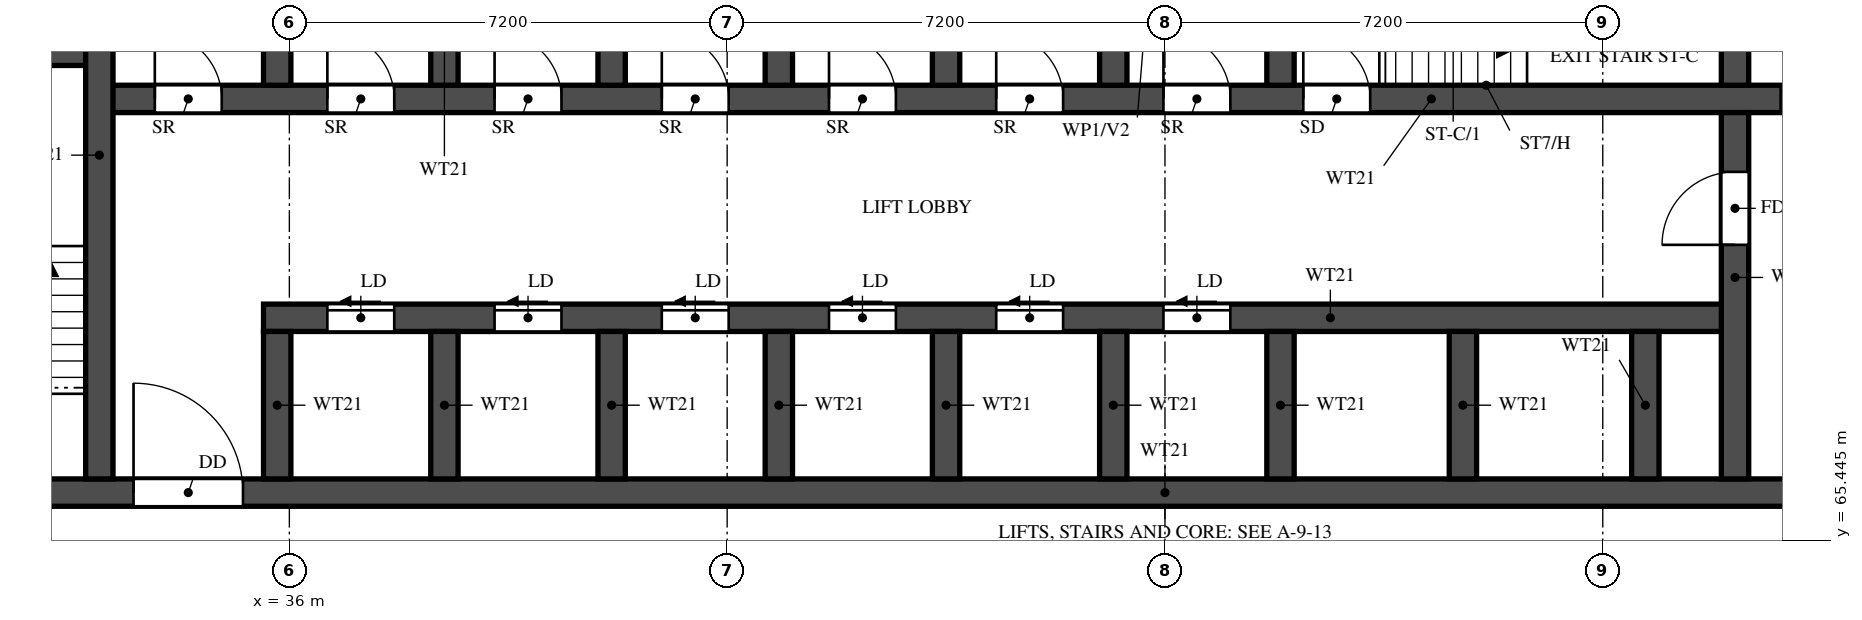
"""IFC4 building model, lengths in metres.
Left out: names, types, materials, properties, quantities, classifications, styles, units other than length and angle.
Written with IfcOpenShell. Run it as: python <this file> out.ifc"""

import sys

from ifc_helpers import new_model, si_unit, direction, frame, frame_2d, origin, place, context, subcontext, project, spatial, rectangle, extrude, element, fill, save


model = new_model("IFC4")
c1 = context("Model", 3, precision=1e-05, world=origin(), true_north=direction((0.0, 1.0)))
c2 = subcontext(c1, "Body", "Model", "MODEL_VIEW")
j1 = project(units=[si_unit("LENGTHUNIT", "METRE"), si_unit("PLANEANGLEUNIT", "RADIAN")], contexts=[c1])
p1 = place(None, origin())
s1 = spatial("IfcSite", under=j1, at=p1, CompositionType="ELEMENT")
p2 = place(p1, origin())
s2 = spatial("IfcBuilding", under=s1, at=p2, CompositionType="ELEMENT")
p3 = place(p2, frame((0.0, 0.0, 83.0)))
s3 = spatial("IfcBuildingStorey", under=s2, at=p3, CompositionType="ELEMENT", Elevation=83.0)
p4 = place(p3, frame((29.7, 66.225, 0.0), z_axis=(0.0, 0.0, 1.0), x_axis=(1.0, 0.0, 0.0)))
e1 = element("IfcWall", 1, at=p4, inside=s3, PredefinedType="SHEAR", context=c2, shape_type="SweptSolid", body=[
    extrude(rectangle(XDim=41.4, YDim=0.45, at=frame_2d((20.7, 0.0))), origin(), (0.0, 0.0, 1.0), 3.18),
])
p5 = place(p4, frame((0.925, 0.0, 0.0)))
e2 = element("IfcOpeningElement", 2, at=p5, cuts=e1, PredefinedType="OPENING", context=c2, shape_type="SweptSolid", body=[
    extrude(rectangle(XDim=1.1, YDim=2.1, at=frame_2d((0.55, 1.05))), frame((0.0, 0.235, 0.0), z_axis=(0.0, -1.0, 0.0), x_axis=(1.0, 0.0, 0.0)), (0.0, 0.0, 1.0), 0.47),
])
p6 = place(p4, frame((3.738, 0.0, 0.0)))
e3 = element("IfcOpeningElement", 3, at=p6, cuts=e1, PredefinedType="OPENING", context=c2, shape_type="SweptSolid", body=[
    extrude(rectangle(XDim=1.8, YDim=2.1, at=frame_2d((0.9, 1.05))), frame((0.0, 0.235, 0.0), z_axis=(0.0, -1.0, 0.0), x_axis=(1.0, 0.0, 0.0)), (0.0, 0.0, 1.0), 0.47),
])
p7 = place(p3, frame((35.575, 69.1, 0.0), z_axis=(0.0, 0.0, 1.0), x_axis=(1.0, 0.0, 0.0)))
e4 = element("IfcWall", 4, at=p7, inside=s3, PredefinedType="SHEAR", context=c2, shape_type="SweptSolid", body=[
    extrude(rectangle(XDim=24.2, YDim=0.45, at=frame_2d((12.1, 0.0))), origin(), (0.0, 0.0, 1.0), 3.18),
])
p8 = place(p7, frame((1.05, 0.0, 0.0)))
e5 = element("IfcOpeningElement", 5, at=p8, cuts=e4, PredefinedType="OPENING", context=c2, shape_type="SweptSolid", body=[
    extrude(rectangle(XDim=1.1, YDim=2.1, at=frame_2d((0.55, 1.05))), frame((0.0, 0.235, 0.0), z_axis=(0.0, -1.0, 0.0), x_axis=(1.0, 0.0, 0.0)), (0.0, 0.0, 1.0), 0.47),
])
p9 = place(p7, frame((3.8, 0.0, 0.0)))
e6 = element("IfcOpeningElement", 6, at=p9, cuts=e4, PredefinedType="OPENING", context=c2, shape_type="SweptSolid", body=[
    extrude(rectangle(XDim=1.1, YDim=2.1, at=frame_2d((0.55, 1.05))), frame((0.0, 0.235, 0.0), z_axis=(0.0, -1.0, 0.0), x_axis=(1.0, 0.0, 0.0)), (0.0, 0.0, 1.0), 0.47),
])
p10 = place(p7, frame((6.55, 0.0, 0.0)))
e7 = element("IfcOpeningElement", 7, at=p10, cuts=e4, PredefinedType="OPENING", context=c2, shape_type="SweptSolid", body=[
    extrude(rectangle(XDim=1.1, YDim=2.1, at=frame_2d((0.55, 1.05))), frame((0.0, 0.235, 0.0), z_axis=(0.0, -1.0, 0.0), x_axis=(1.0, 0.0, 0.0)), (0.0, 0.0, 1.0), 0.47),
])
p11 = place(p7, frame((9.3, 0.0, 0.0)))
e8 = element("IfcOpeningElement", 8, at=p11, cuts=e4, PredefinedType="OPENING", context=c2, shape_type="SweptSolid", body=[
    extrude(rectangle(XDim=1.1, YDim=2.1, at=frame_2d((0.55, 1.05))), frame((0.0, 0.235, 0.0), z_axis=(0.0, -1.0, 0.0), x_axis=(1.0, 0.0, 0.0)), (0.0, 0.0, 1.0), 0.47),
])
p12 = place(p7, frame((12.05, 0.0, 0.0)))
e9 = element("IfcOpeningElement", 9, at=p12, cuts=e4, PredefinedType="OPENING", context=c2, shape_type="SweptSolid", body=[
    extrude(rectangle(XDim=1.1, YDim=2.1, at=frame_2d((0.55, 1.05))), frame((0.0, 0.235, 0.0), z_axis=(0.0, -1.0, 0.0), x_axis=(1.0, 0.0, 0.0)), (0.0, 0.0, 1.0), 0.47),
])
p13 = place(p7, frame((14.8, 0.0, 0.0)))
e10 = element("IfcOpeningElement", 10, at=p13, cuts=e4, PredefinedType="OPENING", context=c2, shape_type="SweptSolid", body=[
    extrude(rectangle(XDim=1.1, YDim=2.1, at=frame_2d((0.55, 1.05))), frame((0.0, 0.235, 0.0), z_axis=(0.0, -1.0, 0.0), x_axis=(1.0, 0.0, 0.0)), (0.0, 0.0, 1.0), 0.47),
])
p14 = place(p3, frame((32.875, 72.7, 0.0), z_axis=(0.0, 0.0, 1.0), x_axis=(1.0, 0.0, 0.0)))
e11 = element("IfcWall", 11, at=p14, inside=s3, PredefinedType="SHEAR", context=c2, shape_type="SweptSolid", body=[
    extrude(rectangle(XDim=35.05, YDim=0.45, at=frame_2d((17.525, 0.0))), origin(), (0.0, 0.0, 1.0), 3.18),
])
p15 = place(p14, frame((19.8, 0.0, 0.0)))
e12 = element("IfcOpeningElement", 12, at=p15, cuts=e11, PredefinedType="OPENING", context=c2, shape_type="SweptSolid", body=[
    extrude(rectangle(XDim=1.1, YDim=2.1, at=frame_2d((0.55, 1.05))), frame((0.0, 0.235, 0.0), z_axis=(0.0, -1.0, 0.0), x_axis=(1.0, 0.0, 0.0)), (0.0, 0.0, 1.0), 0.47),
])
p16 = place(p14, frame((27.65, 0.0, 0.0)))
e13 = element("IfcOpeningElement", 13, at=p16, cuts=e11, PredefinedType="OPENING", context=c2, shape_type="SweptSolid", body=[
    extrude(rectangle(XDim=1.1, YDim=2.1, at=frame_2d((0.55, 1.05))), frame((0.0, 0.235, 0.0), z_axis=(0.0, -1.0, 0.0), x_axis=(1.0, 0.0, 0.0)), (0.0, 0.0, 1.0), 0.47),
])
p17 = place(p14, frame((30.25, 0.0, 0.0)))
e14 = element("IfcOpeningElement", 14, at=p17, cuts=e11, PredefinedType="OPENING", context=c2, shape_type="SweptSolid", body=[
    extrude(rectangle(XDim=1.1, YDim=2.1, at=frame_2d((0.55, 1.05))), frame((0.0, 0.235, 0.0), z_axis=(0.0, -1.0, 0.0), x_axis=(1.0, 0.0, 0.0)), (0.0, 0.0, 1.0), 0.47),
])
p18 = place(p14, frame((3.75, 0.0, 0.0)))
e15 = element("IfcOpeningElement", 15, at=p18, cuts=e11, PredefinedType="OPENING", context=c2, shape_type="SweptSolid", body=[
    extrude(rectangle(XDim=1.1, YDim=2.1, at=frame_2d((0.55, 1.05))), frame((0.0, 0.235, 0.0), z_axis=(0.0, -1.0, 0.0), x_axis=(1.0, 0.0, 0.0)), (0.0, 0.0, 1.0), 0.47),
])
p19 = place(p14, frame((6.5, 0.0, 0.0)))
e16 = element("IfcOpeningElement", 16, at=p19, cuts=e11, PredefinedType="OPENING", context=c2, shape_type="SweptSolid", body=[
    extrude(rectangle(XDim=1.1, YDim=2.1, at=frame_2d((0.55, 1.05))), frame((0.0, 0.235, 0.0), z_axis=(0.0, -1.0, 0.0), x_axis=(1.0, 0.0, 0.0)), (0.0, 0.0, 1.0), 0.47),
])
p20 = place(p14, frame((9.25, 0.0, 0.0)))
e17 = element("IfcOpeningElement", 17, at=p20, cuts=e11, PredefinedType="OPENING", context=c2, shape_type="SweptSolid", body=[
    extrude(rectangle(XDim=1.1, YDim=2.1, at=frame_2d((0.55, 1.05))), frame((0.0, 0.235, 0.0), z_axis=(0.0, -1.0, 0.0), x_axis=(1.0, 0.0, 0.0)), (0.0, 0.0, 1.0), 0.47),
])
p21 = place(p14, frame((12.0, 0.0, 0.0)))
e18 = element("IfcOpeningElement", 18, at=p21, cuts=e11, PredefinedType="OPENING", context=c2, shape_type="SweptSolid", body=[
    extrude(rectangle(XDim=1.1, YDim=2.1, at=frame_2d((0.55, 1.05))), frame((0.0, 0.235, 0.0), z_axis=(0.0, -1.0, 0.0), x_axis=(1.0, 0.0, 0.0)), (0.0, 0.0, 1.0), 0.47),
])
p22 = place(p14, frame((14.75, 0.0, 0.0)))
e19 = element("IfcOpeningElement", 19, at=p22, cuts=e11, PredefinedType="OPENING", context=c2, shape_type="SweptSolid", body=[
    extrude(rectangle(XDim=1.1, YDim=2.1, at=frame_2d((0.55, 1.05))), frame((0.0, 0.235, 0.0), z_axis=(0.0, -1.0, 0.0), x_axis=(1.0, 0.0, 0.0)), (0.0, 0.0, 1.0), 0.47),
])
p23 = place(p14, frame((17.5, 0.0, 0.0)))
e20 = element("IfcOpeningElement", 20, at=p23, cuts=e11, PredefinedType="OPENING", context=c2, shape_type="SweptSolid", body=[
    extrude(rectangle(XDim=1.1, YDim=2.1, at=frame_2d((0.55, 1.05))), frame((0.0, 0.235, 0.0), z_axis=(0.0, -1.0, 0.0), x_axis=(1.0, 0.0, 0.0)), (0.0, 0.0, 1.0), 0.47),
])
p24 = place(p14, frame((0.913, 0.0, 0.0)))
e21 = element("IfcOpeningElement", 21, at=p24, cuts=e11, PredefinedType="OPENING", context=c2, shape_type="SweptSolid", body=[
    extrude(rectangle(XDim=1.1, YDim=2.1, at=frame_2d((0.55, 1.05))), frame((0.0, 0.235, 0.0), z_axis=(0.0, -1.0, 0.0), x_axis=(1.0, 0.0, 0.0)), (0.0, 0.0, 1.0), 0.47),
])
p25 = place(p3, frame((29.7, 73.475, 0.0), z_axis=(0.0, 0.0, 1.0), x_axis=(1.0, 0.0, 0.0)))
e22 = element("IfcWall", 22, at=p25, inside=s3, PredefinedType="SHEAR", context=c2, shape_type="SweptSolid", body=[
    extrude(rectangle(XDim=3.175, YDim=0.45, at=frame_2d((1.587, 0.0))), origin(), (0.0, 0.0, 1.0), 3.18),
])
p26 = place(p3, frame((32.875, 66.45, 0.0), z_axis=(0.0, 0.0, 1.0), x_axis=(0.0, 1.0, 0.0)))
e23 = element("IfcWall", 23, at=p26, inside=s3, PredefinedType="SHEAR", context=c2, shape_type="SweptSolid", body=[
    extrude(rectangle(XDim=10.65, YDim=0.45, at=frame_2d((5.325, 0.0))), origin(), (0.0, 0.0, 1.0), 3.18),
])
p27 = place(p3, frame((59.775, 66.45, 0.0), z_axis=(0.0, 0.0, 1.0), x_axis=(0.0, 1.0, 0.0)))
e24 = element("IfcWall", 24, at=p27, inside=s3, PredefinedType="SHEAR", context=c2, shape_type="SweptSolid", body=[
    extrude(rectangle(XDim=6.025, YDim=0.45, at=frame_2d((3.013, 0.0))), origin(), (0.0, 0.0, 1.0), 3.18),
])
p28 = place(p27, frame((3.85, 0.0, 0.0)))
e25 = element("IfcOpeningElement", 25, at=p28, cuts=e24, PredefinedType="OPENING", context=c2, shape_type="SweptSolid", body=[
    extrude(rectangle(XDim=1.2, YDim=2.1, at=frame_2d((0.6, 1.05))), frame((0.0, 0.235, 0.0), z_axis=(0.0, -1.0, 0.0), x_axis=(1.0, 0.0, 0.0)), (0.0, 0.0, 1.0), 0.47),
])
p29 = place(p3, frame((59.775, 72.925, 0.0), z_axis=(0.0, 0.0, 1.0), x_axis=(0.0, 1.0, 0.0)))
e26 = element("IfcWall", 26, at=p29, inside=s3, PredefinedType="SHEAR", context=c2, shape_type="SweptSolid", body=[
    extrude(rectangle(XDim=2.95, YDim=0.45, at=frame_2d((1.475, 0.0))), origin(), (0.0, 0.0, 1.0), 3.18),
])
for number, where, z_axis, x_axis in (
    (27, (35.8, 66.45, 0.0), (0.0, 0.0, 1.0), (0.0, 1.0, 0.0)),
    (28, (38.55, 66.45, 0.0), (0.0, 0.0, 1.0), (0.0, 1.0, 0.0)),
    (29, (41.3, 66.45, 0.0), (0.0, 0.0, 1.0), (0.0, 1.0, 0.0)),
    (30, (44.05, 66.45, 0.0), (0.0, 0.0, 1.0), (0.0, 1.0, 0.0)),
    (31, (46.8, 66.45, 0.0), (0.0, 0.0, 1.0), (0.0, 1.0, 0.0)),
    (32, (49.55, 66.45, 0.0), (0.0, 0.0, 1.0), (0.0, 1.0, 0.0)),
    (33, (52.3, 66.45, 0.0), (0.0, 0.0, 1.0), (0.0, 1.0, 0.0)),
    (34, (55.3, 66.45, 0.0), (0.0, 0.0, 1.0), (0.0, 1.0, 0.0)),
    (35, (58.3, 66.45, 0.0), (0.0, 0.0, 1.0), (0.0, 1.0, 0.0)),
):
    element("IfcWall", number, at=place(p3, frame(where, z_axis=z_axis, x_axis=x_axis)), inside=s3, PredefinedType="SHEAR", context=c2, shape_type="SweptSolid", body=[
        extrude(rectangle(XDim=2.425, YDim=0.45, at=frame_2d((1.212, 0.0))), origin(), (0.0, 0.0, 1.0), 3.18),
    ])
for number, where, z_axis, x_axis in (
    (36, (35.8, 72.925, 0.0), (0.0, 0.0, 1.0), (0.0, 1.0, 0.0)),
    (37, (38.55, 72.925, 0.0), (0.0, 0.0, 1.0), (0.0, 1.0, 0.0)),
    (38, (41.3, 72.925, 0.0), (0.0, 0.0, 1.0), (0.0, 1.0, 0.0)),
    (39, (44.05, 72.925, 0.0), (0.0, 0.0, 1.0), (0.0, 1.0, 0.0)),
    (40, (46.8, 72.925, 0.0), (0.0, 0.0, 1.0), (0.0, 1.0, 0.0)),
    (41, (49.55, 72.925, 0.0), (0.0, 0.0, 1.0), (0.0, 1.0, 0.0)),
    (42, (52.3, 72.925, 0.0), (0.0, 0.0, 1.0), (0.0, 1.0, 0.0)),
):
    element("IfcWall", number, at=place(p3, frame(where, z_axis=z_axis, x_axis=x_axis)), inside=s3, PredefinedType="SHEAR", context=c2, shape_type="SweptSolid", body=[
        extrude(rectangle(XDim=2.95, YDim=0.45, at=frame_2d((1.475, 0.0))), origin(), (0.0, 0.0, 1.0), 3.18),
    ])
p30 = place(p15, origin())
e43 = element("IfcDoor", 43, at=p30, inside=s3, OperationType="SINGLE_SWING_LEFT", PredefinedType="DOOR", context=c2, shape_type="SweptSolid", body=[
    extrude(rectangle(XDim=1.1, YDim=2.1, at=frame_2d((0.55, 1.05))), frame((0.0, 0.025, 0.0), z_axis=(0.0, -1.0, 0.0), x_axis=(1.0, 0.0, 0.0)), (0.0, 0.0, 1.0), 0.05),
])
fill(e12, e43)
p31 = place(p6, origin())
e44 = element("IfcDoor", 44, at=p31, inside=s3, OperationType="DOUBLE_DOOR_SINGLE_SWING", PredefinedType="DOOR", context=c2, shape_type="SweptSolid", body=[
    extrude(rectangle(XDim=1.8, YDim=2.1, at=frame_2d((0.9, 1.05))), frame((0.0, 0.025, 0.0), z_axis=(0.0, -1.0, 0.0), x_axis=(1.0, 0.0, 0.0)), (0.0, 0.0, 1.0), 0.05),
])
fill(e3, e44)
p32 = place(p28, origin())
e45 = element("IfcDoor", 45, at=p32, inside=s3, OperationType="SINGLE_SWING_RIGHT", PredefinedType="DOOR", context=c2, shape_type="SweptSolid", body=[
    extrude(rectangle(XDim=1.2, YDim=2.1, at=frame_2d((0.6, 1.05))), frame((0.0, 0.025, 0.0), z_axis=(0.0, -1.0, 0.0), x_axis=(1.0, 0.0, 0.0)), (0.0, 0.0, 1.0), 0.05),
])
fill(e25, e45)
p33 = place(p16, origin())
e46 = element("IfcDoor", 46, at=p33, inside=s3, OperationType="SLIDING_TO_LEFT", PredefinedType="DOOR", context=c2, shape_type="SweptSolid", body=[
    extrude(rectangle(XDim=1.1, YDim=2.1, at=frame_2d((0.55, 1.05))), frame((0.0, 0.025, 0.0), z_axis=(0.0, -1.0, 0.0), x_axis=(1.0, 0.0, 0.0)), (0.0, 0.0, 1.0), 0.05),
])
fill(e13, e46)
p34 = place(p8, origin())
e47 = element("IfcDoor", 47, at=p34, inside=s3, OperationType="SLIDING_TO_LEFT", PredefinedType="DOOR", context=c2, shape_type="SweptSolid", body=[
    extrude(rectangle(XDim=1.1, YDim=2.1, at=frame_2d((0.55, 1.05))), frame((0.0, 0.025, 0.0), z_axis=(0.0, -1.0, 0.0), x_axis=(1.0, 0.0, 0.0)), (0.0, 0.0, 1.0), 0.05),
])
fill(e5, e47)
p35 = place(p9, origin())
e48 = element("IfcDoor", 48, at=p35, inside=s3, OperationType="SLIDING_TO_LEFT", PredefinedType="DOOR", context=c2, shape_type="SweptSolid", body=[
    extrude(rectangle(XDim=1.1, YDim=2.1, at=frame_2d((0.55, 1.05))), frame((0.0, 0.025, 0.0), z_axis=(0.0, -1.0, 0.0), x_axis=(1.0, 0.0, 0.0)), (0.0, 0.0, 1.0), 0.05),
])
fill(e6, e48)
p36 = place(p10, origin())
e49 = element("IfcDoor", 49, at=p36, inside=s3, OperationType="SLIDING_TO_LEFT", PredefinedType="DOOR", context=c2, shape_type="SweptSolid", body=[
    extrude(rectangle(XDim=1.1, YDim=2.1, at=frame_2d((0.55, 1.05))), frame((0.0, 0.025, 0.0), z_axis=(0.0, -1.0, 0.0), x_axis=(1.0, 0.0, 0.0)), (0.0, 0.0, 1.0), 0.05),
])
fill(e7, e49)
p37 = place(p11, origin())
e50 = element("IfcDoor", 50, at=p37, inside=s3, OperationType="SLIDING_TO_LEFT", PredefinedType="DOOR", context=c2, shape_type="SweptSolid", body=[
    extrude(rectangle(XDim=1.1, YDim=2.1, at=frame_2d((0.55, 1.05))), frame((0.0, 0.025, 0.0), z_axis=(0.0, -1.0, 0.0), x_axis=(1.0, 0.0, 0.0)), (0.0, 0.0, 1.0), 0.05),
])
fill(e8, e50)
p38 = place(p12, origin())
e51 = element("IfcDoor", 51, at=p38, inside=s3, OperationType="SLIDING_TO_LEFT", PredefinedType="DOOR", context=c2, shape_type="SweptSolid", body=[
    extrude(rectangle(XDim=1.1, YDim=2.1, at=frame_2d((0.55, 1.05))), frame((0.0, 0.025, 0.0), z_axis=(0.0, -1.0, 0.0), x_axis=(1.0, 0.0, 0.0)), (0.0, 0.0, 1.0), 0.05),
])
fill(e9, e51)
p39 = place(p13, origin())
e52 = element("IfcDoor", 52, at=p39, inside=s3, OperationType="SLIDING_TO_LEFT", PredefinedType="DOOR", context=c2, shape_type="SweptSolid", body=[
    extrude(rectangle(XDim=1.1, YDim=2.1, at=frame_2d((0.55, 1.05))), frame((0.0, 0.025, 0.0), z_axis=(0.0, -1.0, 0.0), x_axis=(1.0, 0.0, 0.0)), (0.0, 0.0, 1.0), 0.05),
])
fill(e10, e52)
p40 = place(p18, origin())
e53 = element("IfcDoor", 53, at=p40, inside=s3, OperationType="SINGLE_SWING_LEFT", PredefinedType="DOOR", context=c2, shape_type="SweptSolid", body=[
    extrude(rectangle(XDim=1.1, YDim=2.1, at=frame_2d((0.55, 1.05))), frame((0.0, 0.025, 0.0), z_axis=(0.0, -1.0, 0.0), x_axis=(1.0, 0.0, 0.0)), (0.0, 0.0, 1.0), 0.05),
])
fill(e15, e53)
p41 = place(p19, origin())
e54 = element("IfcDoor", 54, at=p41, inside=s3, OperationType="SINGLE_SWING_LEFT", PredefinedType="DOOR", context=c2, shape_type="SweptSolid", body=[
    extrude(rectangle(XDim=1.1, YDim=2.1, at=frame_2d((0.55, 1.05))), frame((0.0, 0.025, 0.0), z_axis=(0.0, -1.0, 0.0), x_axis=(1.0, 0.0, 0.0)), (0.0, 0.0, 1.0), 0.05),
])
fill(e16, e54)
p42 = place(p20, origin())
e55 = element("IfcDoor", 55, at=p42, inside=s3, OperationType="SINGLE_SWING_LEFT", PredefinedType="DOOR", context=c2, shape_type="SweptSolid", body=[
    extrude(rectangle(XDim=1.1, YDim=2.1, at=frame_2d((0.55, 1.05))), frame((0.0, 0.025, 0.0), z_axis=(0.0, -1.0, 0.0), x_axis=(1.0, 0.0, 0.0)), (0.0, 0.0, 1.0), 0.05),
])
fill(e17, e55)
p43 = place(p21, origin())
e56 = element("IfcDoor", 56, at=p43, inside=s3, OperationType="SINGLE_SWING_LEFT", PredefinedType="DOOR", context=c2, shape_type="SweptSolid", body=[
    extrude(rectangle(XDim=1.1, YDim=2.1, at=frame_2d((0.55, 1.05))), frame((0.0, 0.025, 0.0), z_axis=(0.0, -1.0, 0.0), x_axis=(1.0, 0.0, 0.0)), (0.0, 0.0, 1.0), 0.05),
])
fill(e18, e56)
p44 = place(p22, origin())
e57 = element("IfcDoor", 57, at=p44, inside=s3, OperationType="SINGLE_SWING_LEFT", PredefinedType="DOOR", context=c2, shape_type="SweptSolid", body=[
    extrude(rectangle(XDim=1.1, YDim=2.1, at=frame_2d((0.55, 1.05))), frame((0.0, 0.025, 0.0), z_axis=(0.0, -1.0, 0.0), x_axis=(1.0, 0.0, 0.0)), (0.0, 0.0, 1.0), 0.05),
])
fill(e19, e57)
p45 = place(p23, origin())
e58 = element("IfcDoor", 58, at=p45, inside=s3, OperationType="SINGLE_SWING_LEFT", PredefinedType="DOOR", context=c2, shape_type="SweptSolid", body=[
    extrude(rectangle(XDim=1.1, YDim=2.1, at=frame_2d((0.55, 1.05))), frame((0.0, 0.025, 0.0), z_axis=(0.0, -1.0, 0.0), x_axis=(1.0, 0.0, 0.0)), (0.0, 0.0, 1.0), 0.05),
])
fill(e20, e58)
p46 = place(p24, origin())
e59 = element("IfcDoor", 59, at=p46, inside=s3, OperationType="SINGLE_SWING_LEFT", PredefinedType="DOOR", context=c2, shape_type="SweptSolid", body=[
    extrude(rectangle(XDim=1.1, YDim=2.1, at=frame_2d((0.55, 1.05))), frame((0.0, 0.025, 0.0), z_axis=(0.0, -1.0, 0.0), x_axis=(1.0, 0.0, 0.0)), (0.0, 0.0, 1.0), 0.05),
])
fill(e21, e59)
save(model, sys.argv[1])
